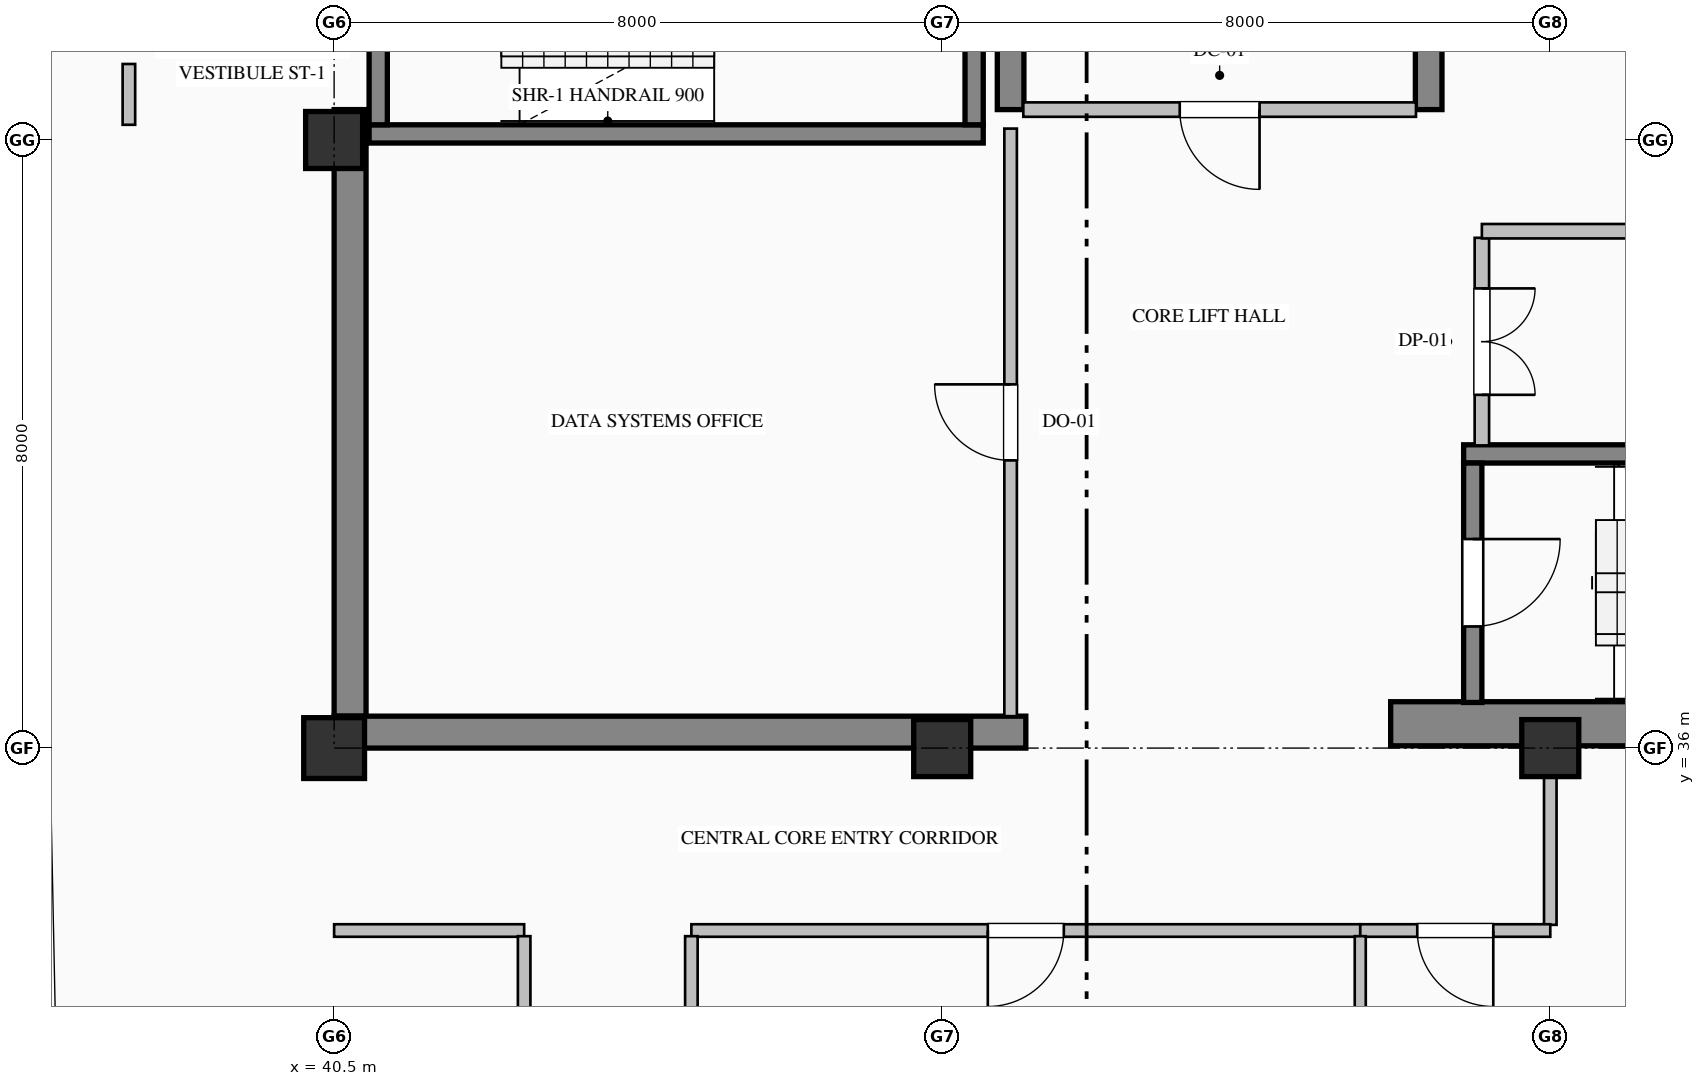
"""IFC4 building model, lengths in metres.
Left out: names, types, materials, properties, quantities, classifications, styles, units other than length and angle.
Written with IfcOpenShell. Run it as: python <this file> out.ifc"""

import sys

from ifc_helpers import new_model, si_unit, direction, frame, frame_2d, origin, origin_2d, place, context, subcontext, project, spatial, rectangle, hollow_rectangle, extrude, element, fill, save


model = new_model("IFC4")
c1 = context("Model", 3, precision=1e-05, world=origin(), true_north=direction((0.0, 1.0)))
c2 = subcontext(c1, "Body", "Model", "MODEL_VIEW")
j1 = project(units=[si_unit("LENGTHUNIT", "METRE"), si_unit("PLANEANGLEUNIT", "RADIAN")], contexts=[c1])
p1 = place(None, origin())
s1 = spatial("IfcSite", under=j1, at=p1, CompositionType="ELEMENT")
p2 = place(p1, origin())
s2 = spatial("IfcBuilding", under=s1, at=p2, CompositionType="ELEMENT")
p3 = place(p2, frame((0.0, 0.0, 339.2)))
s3 = spatial("IfcBuildingStorey", under=s2, at=p3, CompositionType="ELEMENT", Elevation=339.2)
p4 = place(p3, frame((40.71, 36.42, 0.0), z_axis=(0.0, 0.0, 1.0), x_axis=(0.0, 1.0, 0.0)))
e1 = element("IfcWall", 1, at=p4, inside=s3, PredefinedType="SHEAR", context=c2, shape_type="SweptSolid", body=[
    extrude(rectangle(XDim=7.98, YDim=0.42, at=frame_2d((3.99, 0.0))), origin(), (0.0, 0.0, 1.0), 3.785),
])
p5 = place(p3, frame((40.5, 36.21, 0.0), z_axis=(0.0, 0.0, 1.0), x_axis=(1.0, 0.0, 0.0)))
e2 = element("IfcWall", 2, at=p5, inside=s3, PredefinedType="SHEAR", context=c2, shape_type="SweptSolid", body=[
    extrude(rectangle(XDim=9.1, YDim=0.42, at=frame_2d((4.55, 0.0))), origin(), (0.0, 0.0, 1.0), 3.785),
])
p6 = place(p3, frame((54.4, 36.32, 0.0), z_axis=(0.0, 0.0, 1.0), x_axis=(1.0, 0.0, 0.0)))
e3 = element("IfcWall", 3, at=p6, inside=s3, PredefinedType="SHEAR", context=c2, shape_type="SweptSolid", body=[
    extrude(rectangle(XDim=9.6, YDim=0.58, at=frame_2d((4.8, 0.0))), origin(), (0.0, 0.0, 1.0), 4.0),
])
p7 = place(p3, frame((49.4, 44.4, 0.0), z_axis=(0.0, 0.0, 1.0), x_axis=(0.0, 1.0, 0.0)))
e4 = element("IfcWall", 4, at=p7, inside=s3, PredefinedType="SHEAR", context=c2, shape_type="SweptSolid", body=[
    extrude(rectangle(XDim=3.0, YDim=0.35, at=frame_2d((1.5, 0.0))), origin(), (0.0, 0.0, 1.0), 3.785),
])
p8 = place(p3, frame((54.9, 44.4, 0.0), z_axis=(0.0, 0.0, 1.0), x_axis=(0.0, 1.0, 0.0)))
e5 = element("IfcWall", 5, at=p8, inside=s3, PredefinedType="SHEAR", context=c2, shape_type="SweptSolid", body=[
    extrude(rectangle(XDim=7.18, YDim=0.35, at=frame_2d((3.59, 0.0))), origin(), (0.0, 0.0, 1.0), 3.785),
])
p9 = place(p3, frame((40.5, 36.0, 0.0), z_axis=(0.0, 0.0, 1.0), x_axis=(1.0, 0.0, 0.0)))
e6 = element("IfcColumn", 6, at=p9, inside=s3, PredefinedType="COLUMN", context=c2, shape_type="SweptSolid", body=[
    extrude(hollow_rectangle(XDim=0.8, YDim=0.8, WallThickness=0.032, at=origin_2d()), origin(), (0.0, 0.0, 1.0), 4.0),
])
for number, where, z_axis, x_axis in (
    (7, (40.5, 44.0, 0.0), (0.0, 0.0, 1.0), (1.0, 0.0, 0.0)),
    (8, (48.5, 36.0, 0.0), (0.0, 0.0, 1.0), (1.0, 0.0, 0.0)),
    (9, (56.5, 36.0, 0.0), (0.0, 0.0, 1.0), (1.0, 0.0, 0.0)),
):
    element("IfcColumn", number, at=place(p3, frame(where, z_axis=z_axis, x_axis=x_axis)), inside=s3, PredefinedType="COLUMN", context=c2, shape_type="SweptSolid", body=[
        extrude(rectangle(XDim=0.75, YDim=0.75, at=origin_2d()), origin(), (0.0, 0.0, 1.0), 4.0),
    ])
p10 = place(p3, frame((49.04, 44.08, 0.0), z_axis=(0.0, 0.0, 1.0), x_axis=(-1.0, 0.0, 0.0)))
e10 = element("IfcWall", 10, at=p10, inside=s3, PredefinedType="SOLIDWALL", context=c2, shape_type="SweptSolid", body=[
    extrude(rectangle(XDim=8.08, YDim=0.24, at=frame_2d((4.04, 0.0))), origin(), (0.0, 0.0, 1.0), 4.0),
])
p11 = place(p3, frame((41.08, 47.35, 0.0), z_axis=(0.0, 0.0, 1.0), x_axis=(0.0, -1.0, 0.0)))
e11 = element("IfcWall", 11, at=p11, inside=s3, PredefinedType="SOLIDWALL", context=c2, shape_type="SweptSolid", body=[
    extrude(rectangle(XDim=3.15, YDim=0.24, at=frame_2d((1.575, 0.0))), origin(), (0.0, 0.0, 1.0), 4.0),
])
p12 = place(p11, frame((1.0, 0.0, 0.0)))
e12 = element("IfcOpeningElement", 12, at=p12, cuts=e11, PredefinedType="OPENING", context=c2, shape_type="SweptSolid", body=[
    extrude(rectangle(XDim=1.15, YDim=2.2, at=frame_2d((0.575, 1.1))), frame((0.0, 0.13, 0.0), z_axis=(0.0, -1.0, 0.0), x_axis=(1.0, 0.0, 0.0)), (0.0, 0.0, 1.0), 0.26),
])
p13 = place(p3, frame((48.92, 44.2, 0.0), z_axis=(0.0, 0.0, 1.0), x_axis=(0.0, 1.0, 0.0)))
e13 = element("IfcWall", 13, at=p13, inside=s3, PredefinedType="SOLIDWALL", context=c2, shape_type="SweptSolid", body=[
    extrude(rectangle(XDim=3.15, YDim=0.24, at=frame_2d((1.575, 0.0))), origin(), (0.0, 0.0, 1.0), 4.0),
])
p14 = place(p3, frame((55.36, 39.87, 0.0), z_axis=(0.0, 0.0, 1.0), x_axis=(1.0, 0.0, 0.0)))
e14 = element("IfcWall", 14, at=p14, inside=s3, PredefinedType="SOLIDWALL", context=c2, shape_type="SweptSolid", body=[
    extrude(rectangle(XDim=8.08, YDim=0.24, at=frame_2d((4.04, 0.0))), origin(), (0.0, 0.0, 1.0), 4.0),
])
p15 = place(p3, frame((55.48, 39.75, 0.0), z_axis=(0.0, 0.0, 1.0), x_axis=(0.0, -1.0, 0.0)))
e15 = element("IfcWall", 15, at=p15, inside=s3, PredefinedType="SOLIDWALL", context=c2, shape_type="SweptSolid", body=[
    extrude(rectangle(XDim=3.15, YDim=0.24, at=frame_2d((1.575, 0.0))), origin(), (0.0, 0.0, 1.0), 4.0),
])
p16 = place(p15, frame((1.0, 0.0, 0.0)))
e16 = element("IfcOpeningElement", 16, at=p16, cuts=e15, PredefinedType="OPENING", context=c2, shape_type="SweptSolid", body=[
    extrude(rectangle(XDim=1.15, YDim=2.2, at=frame_2d((0.575, 1.1))), frame((0.0, 0.13, 0.0), z_axis=(0.0, -1.0, 0.0), x_axis=(1.0, 0.0, 0.0)), (0.0, 0.0, 1.0), 0.26),
])
p17 = place(p3, frame((37.8, 44.2, 0.0), z_axis=(0.0, 0.0, 1.0), x_axis=(0.0, 1.0, 0.0)))
e17 = element("IfcWall", 17, at=p17, inside=s3, PredefinedType="PARTITIONING", context=c2, shape_type="SweptSolid", body=[
    extrude(rectangle(XDim=0.8, YDim=0.165, at=frame_2d((0.4, 0.0))), origin(), (0.0, 0.0, 1.0), 3.785),
])
p18 = place(p3, frame((54.733, 44.4, 0.0), z_axis=(0.0, 0.0, 1.0), x_axis=(-1.0, 0.0, 0.0)))
e18 = element("IfcWall", 18, at=p18, inside=s3, PredefinedType="PARTITIONING", context=c2, shape_type="SweptSolid", body=[
    extrude(rectangle(XDim=5.166, YDim=0.19, at=frame_2d((2.583, 0.0))), origin(), (0.0, 0.0, 1.0), 3.785),
])
p19 = place(p18, frame((2.058, 0.0, 0.0)))
e19 = element("IfcOpeningElement", 19, at=p19, cuts=e18, PredefinedType="OPENING", context=c2, shape_type="SweptSolid", body=[
    extrude(rectangle(XDim=1.05, YDim=2.15, at=frame_2d((0.525, 1.075))), frame((0.0, 0.105, 0.0), z_axis=(0.0, -1.0, 0.0), x_axis=(1.0, 0.0, 0.0)), (0.0, 0.0, 1.0), 0.21),
])
p20 = place(p3, frame((49.4, 36.42, 0.0), z_axis=(0.0, 0.0, 1.0), x_axis=(0.0, 1.0, 0.0)))
e20 = element("IfcWall", 20, at=p20, inside=s3, PredefinedType="PARTITIONING", context=c2, shape_type="SweptSolid", body=[
    extrude(rectangle(XDim=7.73, YDim=0.165, at=frame_2d((3.865, 0.0))), origin(), (0.0, 0.0, 1.0), 3.027),
])
p21 = place(p20, frame((3.365, 0.0, 0.0)))
e21 = element("IfcOpeningElement", 21, at=p21, cuts=e20, PredefinedType="OPENING", context=c2, shape_type="SweptSolid", body=[
    extrude(rectangle(XDim=1.0, YDim=2.15, at=frame_2d((0.5, 1.075))), frame((0.0, 0.093, 0.0), z_axis=(0.0, -1.0, 0.0), x_axis=(1.0, 0.0, 0.0)), (0.0, 0.0, 1.0), 0.185),
])
p22 = place(p3, frame((55.6, 42.713, 0.0), z_axis=(0.0, 0.0, 1.0), x_axis=(0.0, -1.0, 0.0)))
e22 = element("IfcWall", 22, at=p22, inside=s3, PredefinedType="PARTITIONING", context=c2, shape_type="SweptSolid", body=[
    extrude(rectangle(XDim=2.731, YDim=0.19, at=frame_2d((1.365, 0.0))), origin(), (0.0, 0.0, 1.0), 3.785),
])
p23 = place(p22, frame((0.666, 0.0, 0.0)))
e23 = element("IfcOpeningElement", 23, at=p23, cuts=e22, PredefinedType="OPENING", context=c2, shape_type="SweptSolid", body=[
    extrude(rectangle(XDim=1.4, YDim=2.25, at=frame_2d((0.7, 1.125))), frame((0.0, 0.105, 0.0), z_axis=(0.0, -1.0, 0.0), x_axis=(1.0, 0.0, 0.0)), (0.0, 0.0, 1.0), 0.21),
])
p24 = place(p3, frame((58.2, 42.8, 0.0), z_axis=(0.0, 0.0, 1.0), x_axis=(-1.0, 0.0, 0.0)))
e24 = element("IfcWall", 24, at=p24, inside=s3, PredefinedType="PARTITIONING", context=c2, shape_type="SweptSolid", body=[
    extrude(rectangle(XDim=2.6, YDim=0.19, at=frame_2d((1.3, 0.0))), origin(), (0.0, 0.0, 1.0), 3.785),
])
p25 = place(p3, frame((54.0, 33.6, 0.0), z_axis=(0.0, 0.0, 1.0), x_axis=(-1.0, 0.0, 0.0)))
e25 = element("IfcWall", 25, at=p25, inside=s3, PredefinedType="PARTITIONING", context=c2, shape_type="SweptSolid", body=[
    extrude(rectangle(XDim=8.8, YDim=0.165, at=frame_2d((4.4, 0.0))), origin(), (0.0, 0.0, 1.0), 3.785),
])
p26 = place(p25, frame((3.9, 0.0, 0.0)))
e26 = element("IfcOpeningElement", 26, at=p26, cuts=e25, PredefinedType="OPENING", context=c2, shape_type="SweptSolid", body=[
    extrude(rectangle(XDim=1.0, YDim=2.15, at=frame_2d((0.5, 1.075))), frame((0.0, 0.093, 0.0), z_axis=(0.0, -1.0, 0.0), x_axis=(1.0, 0.0, 0.0)), (0.0, 0.0, 1.0), 0.185),
])
p27 = place(p3, frame((56.5, 36.0, 0.0), z_axis=(0.0, 0.0, 1.0), x_axis=(0.0, -1.0, 0.0)))
e27 = element("IfcWall", 27, at=p27, inside=s3, PredefinedType="PARTITIONING", context=c2, shape_type="SweptSolid", body=[
    extrude(rectangle(XDim=2.325, YDim=0.165, at=frame_2d((1.163, 0.0))), origin(), (0.0, 0.0, 1.0), 3.177),
])
p28 = place(p3, frame((56.5, 33.6, 0.0), z_axis=(0.0, 0.0, 1.0), x_axis=(-1.0, 0.0, 0.0)))
e28 = element("IfcWall", 28, at=p28, inside=s3, PredefinedType="PARTITIONING", context=c2, shape_type="SweptSolid", body=[
    extrude(rectangle(XDim=2.5, YDim=0.165, at=frame_2d((1.25, 0.0))), origin(), (0.0, 0.0, 1.0), 3.785),
])
p29 = place(p28, frame((0.75, 0.0, 0.0)))
e29 = element("IfcOpeningElement", 29, at=p29, cuts=e28, PredefinedType="OPENING", context=c2, shape_type="SweptSolid", body=[
    extrude(rectangle(XDim=1.0, YDim=2.15, at=frame_2d((0.5, 1.075))), frame((0.0, 0.093, 0.0), z_axis=(0.0, -1.0, 0.0), x_axis=(1.0, 0.0, 0.0)), (0.0, 0.0, 1.0), 0.185),
])
p30 = place(p3, frame((43.0, 33.6, 0.0), z_axis=(0.0, 0.0, 1.0), x_axis=(-1.0, 0.0, 0.0)))
e30 = element("IfcWall", 30, at=p30, inside=s3, PredefinedType="PARTITIONING", context=c2, shape_type="SweptSolid", body=[
    extrude(rectangle(XDim=2.5, YDim=0.165, at=frame_2d((1.25, 0.0))), origin(), (0.0, 0.0, 1.0), 3.785),
])
p31 = place(p3, frame((45.2, 33.525, 0.0), z_axis=(0.0, 0.0, 1.0), x_axis=(0.0, -1.0, 0.0)))
e31 = element("IfcWall", 31, at=p31, inside=s3, PredefinedType="PARTITIONING", context=c2, shape_type="SweptSolid", body=[
    extrude(rectangle(XDim=2.961, YDim=0.165, at=frame_2d((1.48, 0.0))), origin(), (0.0, 0.0, 1.0), 3.785),
])
p32 = place(p3, frame((43.0, 22.875, 0.0), z_axis=(0.0, 0.0, 1.0), x_axis=(0.0, 1.0, 0.0)))
e32 = element("IfcWall", 32, at=p32, inside=s3, PredefinedType="PARTITIONING", context=c2, shape_type="SweptSolid", body=[
    extrude(rectangle(XDim=10.651, YDim=0.165, at=frame_2d((5.325, 0.0))), origin(), (0.0, 0.0, 1.0), 3.785),
])
p33 = place(p32, frame((4.875, 0.0, 0.0)))
e33 = element("IfcOpeningElement", 33, at=p33, cuts=e32, PredefinedType="OPENING", context=c2, shape_type="SweptSolid", body=[
    extrude(rectangle(XDim=0.9, YDim=2.15, at=frame_2d((0.45, 1.075))), frame((0.0, 0.093, 0.0), z_axis=(0.0, -1.0, 0.0), x_axis=(1.0, 0.0, 0.0)), (0.0, 0.0, 1.0), 0.185),
])
p34 = place(p3, frame((54.0, 33.525, 0.0), z_axis=(0.0, 0.0, 1.0), x_axis=(0.0, -1.0, 0.0)))
e34 = element("IfcWall", 34, at=p34, inside=s3, PredefinedType="PARTITIONING", context=c2, shape_type="SweptSolid", body=[
    extrude(rectangle(XDim=2.961, YDim=0.145, at=frame_2d((1.48, 0.0))), origin(), (0.0, 0.0, 1.0), 3.785),
])
p35 = place(p16, origin())
e35 = element("IfcDoor", 35, at=p35, inside=s3, OperationType="SINGLE_SWING_LEFT", PredefinedType="DOOR", context=c2, shape_type="SweptSolid", body=[
    extrude(rectangle(XDim=1.15, YDim=2.2, at=frame_2d((0.575, 1.1))), frame((0.0, 0.025, 0.0), z_axis=(0.0, -1.0, 0.0), x_axis=(1.0, 0.0, 0.0)), (0.0, 0.0, 1.0), 0.05),
])
fill(e16, e35)
p36 = place(p19, origin())
e36 = element("IfcDoor", 36, at=p36, inside=s3, OperationType="SINGLE_SWING_LEFT", PredefinedType="DOOR", context=c2, shape_type="SweptSolid", body=[
    extrude(rectangle(XDim=1.05, YDim=2.15, at=frame_2d((0.525, 1.075))), frame((0.0, 0.025, 0.0), z_axis=(0.0, -1.0, 0.0), x_axis=(1.0, 0.0, 0.0)), (0.0, 0.0, 1.0), 0.05),
])
fill(e19, e36)
p37 = place(p21, origin())
e37 = element("IfcDoor", 37, at=p37, inside=s3, OperationType="SINGLE_SWING_RIGHT", PredefinedType="DOOR", context=c2, shape_type="SweptSolid", body=[
    extrude(rectangle(XDim=1.0, YDim=2.15, at=frame_2d((0.5, 1.075))), frame((0.0, 0.025, 0.0), z_axis=(0.0, -1.0, 0.0), x_axis=(1.0, 0.0, 0.0)), (0.0, 0.0, 1.0), 0.05),
])
fill(e21, e37)
p38 = place(p23, origin())
e38 = element("IfcDoor", 38, at=p38, inside=s3, OperationType="DOUBLE_DOOR_SINGLE_SWING", PredefinedType="DOOR", context=c2, shape_type="SweptSolid", body=[
    extrude(rectangle(XDim=1.4, YDim=2.25, at=frame_2d((0.7, 1.125))), frame((0.0, 0.025, 0.0), z_axis=(0.0, -1.0, 0.0), x_axis=(1.0, 0.0, 0.0)), (0.0, 0.0, 1.0), 0.05),
])
fill(e23, e38)
p39 = place(p26, origin())
e39 = element("IfcDoor", 39, at=p39, inside=s3, OperationType="SINGLE_SWING_RIGHT", PredefinedType="DOOR", context=c2, shape_type="SweptSolid", body=[
    extrude(rectangle(XDim=1.0, YDim=2.15, at=frame_2d((0.5, 1.075))), frame((0.0, 0.025, 0.0), z_axis=(0.0, -1.0, 0.0), x_axis=(1.0, 0.0, 0.0)), (0.0, 0.0, 1.0), 0.05),
])
fill(e26, e39)
p40 = place(p29, origin())
e40 = element("IfcDoor", 40, at=p40, inside=s3, OperationType="SINGLE_SWING_LEFT", PredefinedType="DOOR", context=c2, shape_type="SweptSolid", body=[
    extrude(rectangle(XDim=1.0, YDim=2.15, at=frame_2d((0.5, 1.075))), frame((0.0, 0.025, 0.0), z_axis=(0.0, -1.0, 0.0), x_axis=(1.0, 0.0, 0.0)), (0.0, 0.0, 1.0), 0.05),
])
fill(e29, e40)
save(model, sys.argv[1])
